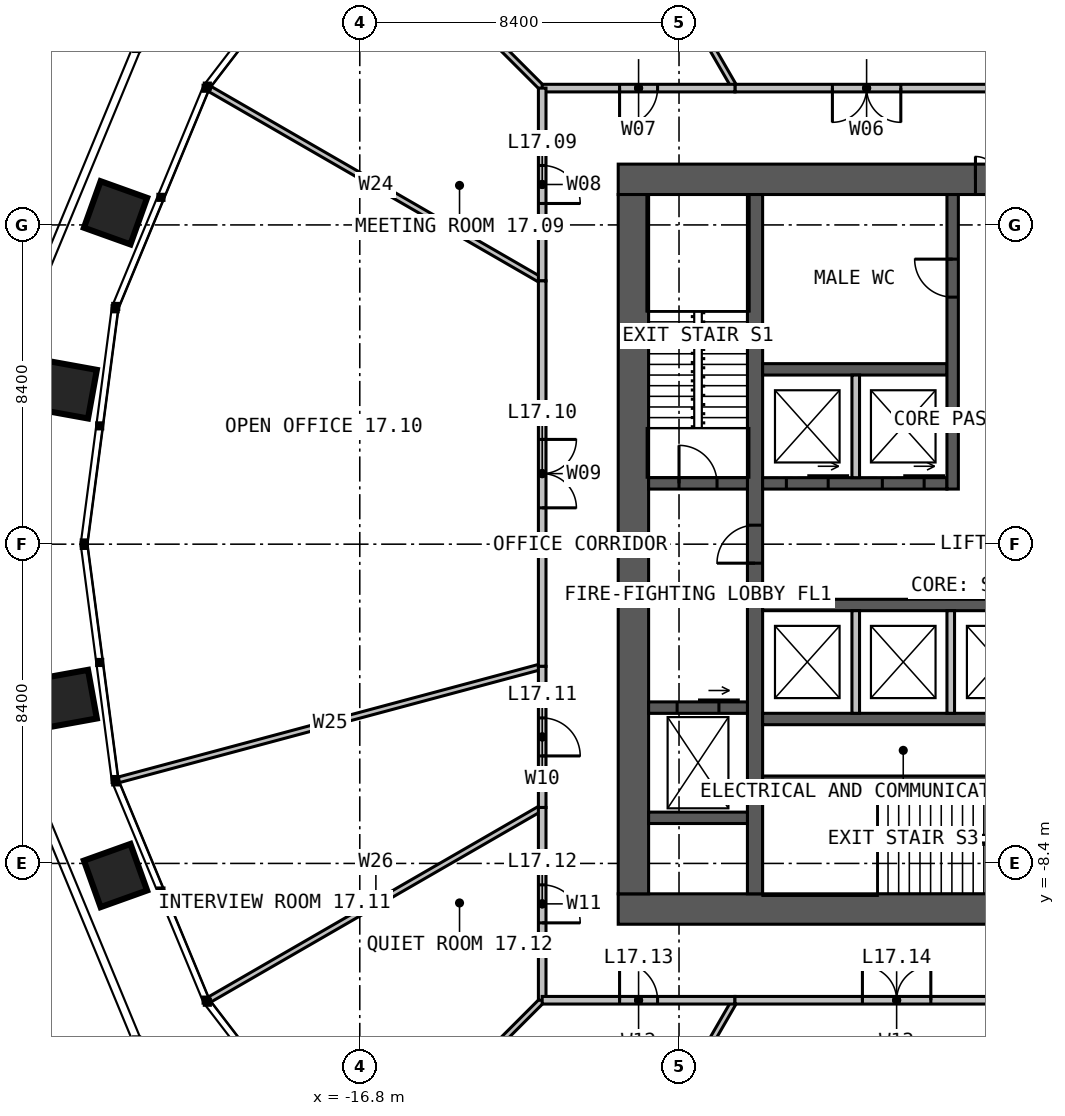
"""IFC4 building model, lengths in metres.
Left out: names, types, materials, properties, quantities, classifications, styles, units other than length and angle.
Written with IfcOpenShell. Run it as: python <this file> out.ifc"""

import sys

from ifc_helpers import new_model, si_unit, direction, frame, frame_2d, origin, place, context, subcontext, project, spatial, rectangle, extrude, element, fill, save


model = new_model("IFC4")
c1 = context("Model", 3, precision=1e-05, world=origin(), true_north=direction((0.0, 1.0)))
c2 = subcontext(c1, "Body", "Model", "MODEL_VIEW")
j1 = project(units=[si_unit("LENGTHUNIT", "METRE"), si_unit("PLANEANGLEUNIT", "RADIAN")], contexts=[c1])
p1 = place(None, origin())
s1 = spatial("IfcSite", under=j1, at=p1, CompositionType="ELEMENT")
p2 = place(p1, origin())
s2 = spatial("IfcBuilding", under=s1, at=p2, CompositionType="ELEMENT")
p3 = place(p2, frame((0.0, 0.0, 73.0)))
s3 = spatial("IfcBuildingStorey", under=s2, at=p3, CompositionType="ELEMENT", Elevation=73.0)
p4 = place(p3, frame((-10.0, 9.6, 0.0), z_axis=(0.0, 0.0, 1.0), x_axis=(1.0, 0.0, 0.0)))
e1 = element("IfcWall", 1, at=p4, inside=s3, PredefinedType="SOLIDWALL", context=c2, shape_type="SweptSolid", body=[
    extrude(rectangle(XDim=20.0, YDim=0.8, at=frame_2d((10.0, 0.0))), origin(), (0.0, 0.0, 1.0), 4.0),
])
p5 = place(p4, frame((9.4, 0.0, 0.0)))
e2 = element("IfcOpeningElement", 2, at=p5, cuts=e1, PredefinedType="OPENING", context=c2, shape_type="SweptSolid", body=[
    extrude(rectangle(XDim=1.2, YDim=2.2, at=frame_2d((0.6, 1.1))), frame((0.0, 0.41, 0.0), z_axis=(0.0, -1.0, 0.0), x_axis=(1.0, 0.0, 0.0)), (0.0, 0.0, 1.0), 0.82),
])
p6 = place(p3, frame((10.0, -9.6, 0.0), z_axis=(0.0, 0.0, 1.0), x_axis=(-1.0, 0.0, 0.0)))
e3 = element("IfcWall", 3, at=p6, inside=s3, PredefinedType="SOLIDWALL", context=c2, shape_type="SweptSolid", body=[
    extrude(rectangle(XDim=20.0, YDim=0.8, at=frame_2d((10.0, 0.0))), origin(), (0.0, 0.0, 1.0), 4.0),
])
p7 = place(p6, frame((6.875, 0.0, 0.0)))
e4 = element("IfcOpeningElement", 4, at=p7, cuts=e3, PredefinedType="OPENING", context=c2, shape_type="SweptSolid", body=[
    extrude(rectangle(XDim=1.2, YDim=2.2, at=frame_2d((0.6, 1.1))), frame((0.0, 0.41, 0.0), z_axis=(0.0, -1.0, 0.0), x_axis=(1.0, 0.0, 0.0)), (0.0, 0.0, 1.0), 0.82),
])
p8 = place(p3, frame((-9.6, 9.2, 0.0), z_axis=(0.0, 0.0, 1.0), x_axis=(0.0, -1.0, 0.0)))
e5 = element("IfcWall", 5, at=p8, inside=s3, PredefinedType="SOLIDWALL", context=c2, shape_type="SweptSolid", body=[
    extrude(rectangle(XDim=18.4, YDim=0.8, at=frame_2d((9.2, 0.0))), origin(), (0.0, 0.0, 1.0), 4.0),
])
p9 = place(p3, frame((-6.4, -9.2, 0.0), z_axis=(0.0, 0.0, 1.0), x_axis=(0.0, 1.0, 0.0)))
e6 = element("IfcWall", 6, at=p9, inside=s3, PredefinedType="SOLIDWALL", context=c2, shape_type="SweptSolid", body=[
    extrude(rectangle(XDim=18.4, YDim=0.4, at=frame_2d((9.2, 0.0))), origin(), (0.0, 0.0, 1.0), 4.0),
])
p10 = place(p9, frame((8.7, 0.0, 0.0)))
e7 = element("IfcOpeningElement", 7, at=p10, cuts=e6, PredefinedType="OPENING", context=c2, shape_type="SweptSolid", body=[
    extrude(rectangle(XDim=1.0, YDim=2.2, at=frame_2d((0.5, 1.1))), frame((0.0, 0.21, 0.0), z_axis=(0.0, -1.0, 0.0), x_axis=(1.0, 0.0, 0.0)), (0.0, 0.0, 1.0), 0.42),
])
p11 = place(p3, frame((-6.2, 1.6, 0.0), z_axis=(0.0, 0.0, 1.0), x_axis=(1.0, 0.0, 0.0)))
e8 = element("IfcWall", 8, at=p11, inside=s3, PredefinedType="SOLIDWALL", context=c2, shape_type="SweptSolid", body=[
    extrude(rectangle(XDim=4.85, YDim=0.3, at=frame_2d((2.425, 0.0))), origin(), (0.0, 0.0, 1.0), 4.0),
])
p12 = place(p11, frame((0.625, 0.0, 0.0)))
e9 = element("IfcOpeningElement", 9, at=p12, cuts=e8, PredefinedType="OPENING", context=c2, shape_type="SweptSolid", body=[
    extrude(rectangle(XDim=1.1, YDim=2.2, at=frame_2d((0.55, 1.1))), frame((0.0, 0.16, 0.0), z_axis=(0.0, -1.0, 0.0), x_axis=(1.0, 0.0, 0.0)), (0.0, 0.0, 1.0), 0.32),
])
p13 = place(p11, frame((3.15, 0.0, 0.0)))
e10 = element("IfcOpeningElement", 10, at=p13, cuts=e8, PredefinedType="OPENING", context=c2, shape_type="SweptSolid", body=[
    extrude(rectangle(XDim=1.1, YDim=2.2, at=frame_2d((0.55, 1.1))), frame((0.0, 0.16, 0.0), z_axis=(0.0, -1.0, 0.0), x_axis=(1.0, 0.0, 0.0)), (0.0, 0.0, 1.0), 0.32),
])
p14 = place(p3, frame((-6.2, 4.6, 0.0), z_axis=(0.0, 0.0, 1.0), x_axis=(1.0, 0.0, 0.0)))
e11 = element("IfcWall", 11, at=p14, inside=s3, PredefinedType="SOLIDWALL", context=c2, shape_type="SweptSolid", body=[
    extrude(rectangle(XDim=4.85, YDim=0.3, at=frame_2d((2.425, 0.0))), origin(), (0.0, 0.0, 1.0), 4.0),
])
p15 = place(p3, frame((-1.2, 1.45, 0.0), z_axis=(0.0, 0.0, 1.0), x_axis=(0.0, 1.0, 0.0)))
e12 = element("IfcWall", 12, at=p15, inside=s3, PredefinedType="SOLIDWALL", context=c2, shape_type="SweptSolid", body=[
    extrude(rectangle(XDim=7.75, YDim=0.3, at=frame_2d((3.875, 0.0))), origin(), (0.0, 0.0, 1.0), 4.0),
])
p16 = place(p15, frame((5.05, 0.0, 0.0)))
e13 = element("IfcOpeningElement", 13, at=p16, cuts=e12, PredefinedType="OPENING", context=c2, shape_type="SweptSolid", body=[
    extrude(rectangle(XDim=1.0, YDim=2.2, at=frame_2d((0.5, 1.1))), frame((0.0, 0.16, 0.0), z_axis=(0.0, -1.0, 0.0), x_axis=(1.0, 0.0, 0.0)), (0.0, 0.0, 1.0), 0.32),
])
for number, where, z_axis, x_axis in (
    (14, (-6.2, -1.6, 0.0), (0.0, 0.0, 1.0), (1.0, 0.0, 0.0)),
    (15, (-6.2, -4.6, 0.0), (0.0, 0.0, 1.0), (1.0, 0.0, 0.0)),
):
    element("IfcWall", number, at=place(p3, frame(where, z_axis=z_axis, x_axis=x_axis)), inside=s3, PredefinedType="SOLIDWALL", context=c2, shape_type="SweptSolid", body=[
        extrude(rectangle(XDim=7.4, YDim=0.3, at=frame_2d((3.7, 0.0))), origin(), (0.0, 0.0, 1.0), 4.0),
    ])
p17 = place(p3, frame((-6.2, -6.2, 0.0), z_axis=(0.0, 0.0, 1.0), x_axis=(1.0, 0.0, 0.0)))
e16 = element("IfcWall", 16, at=p17, inside=s3, PredefinedType="SOLIDWALL", context=c2, shape_type="SweptSolid", body=[
    extrude(rectangle(XDim=7.4, YDim=0.2, at=frame_2d((3.7, 0.0))), origin(), (0.0, 0.0, 1.0), 4.0),
])
p18 = place(p3, frame((-9.2, 1.6, 0.0), z_axis=(0.0, 0.0, 1.0), x_axis=(1.0, 0.0, 0.0)))
e17 = element("IfcWall", 17, at=p18, inside=s3, PredefinedType="SOLIDWALL", context=c2, shape_type="SweptSolid", body=[
    extrude(rectangle(XDim=2.6, YDim=0.3, at=frame_2d((1.3, 0.0))), origin(), (0.0, 0.0, 1.0), 4.0),
])
p19 = place(p18, frame((0.8, 0.0, 0.0)))
e18 = element("IfcOpeningElement", 18, at=p19, cuts=e17, PredefinedType="OPENING", context=c2, shape_type="SweptSolid", body=[
    extrude(rectangle(XDim=1.0, YDim=2.2, at=frame_2d((0.5, 1.1))), frame((0.0, 0.16, 0.0), z_axis=(0.0, -1.0, 0.0), x_axis=(1.0, 0.0, 0.0)), (0.0, 0.0, 1.0), 0.32),
])
p20 = place(p3, frame((-9.2, -4.3, 0.0), z_axis=(0.0, 0.0, 1.0), x_axis=(1.0, 0.0, 0.0)))
e19 = element("IfcWall", 19, at=p20, inside=s3, PredefinedType="SOLIDWALL", context=c2, shape_type="SweptSolid", body=[
    extrude(rectangle(XDim=2.6, YDim=0.3, at=frame_2d((1.3, 0.0))), origin(), (0.0, 0.0, 1.0), 4.0),
])
p21 = place(p20, frame((0.75, 0.0, 0.0)))
e20 = element("IfcOpeningElement", 20, at=p21, cuts=e19, PredefinedType="OPENING", context=c2, shape_type="SweptSolid", body=[
    extrude(rectangle(XDim=1.1, YDim=2.2, at=frame_2d((0.55, 1.1))), frame((0.0, 0.16, 0.0), z_axis=(0.0, -1.0, 0.0), x_axis=(1.0, 0.0, 0.0)), (0.0, 0.0, 1.0), 0.32),
])
p22 = place(p3, frame((-9.2, -7.2, 0.0), z_axis=(0.0, 0.0, 1.0), x_axis=(1.0, 0.0, 0.0)))
e21 = element("IfcWall", 21, at=p22, inside=s3, PredefinedType="SOLIDWALL", context=c2, shape_type="SweptSolid", body=[
    extrude(rectangle(XDim=2.6, YDim=0.3, at=frame_2d((1.3, 0.0))), origin(), (0.0, 0.0, 1.0), 4.0),
])
for number, where, z_axis, x_axis in (
    (22, (-3.75, 1.75, 0.0), (0.0, 0.0, 1.0), (0.0, 1.0, 0.0)),
    (23, (-3.75, -1.75, 0.0), (0.0, 0.0, 1.0), (0.0, -1.0, 0.0)),
    (24, (-1.25, -1.75, 0.0), (0.0, 0.0, 1.0), (0.0, -1.0, 0.0)),
):
    element("IfcWall", number, at=place(p3, frame(where, z_axis=z_axis, x_axis=x_axis)), inside=s3, PredefinedType="SOLIDWALL", context=c2, shape_type="SweptSolid", body=[
        extrude(rectangle(XDim=2.7, YDim=0.2, at=frame_2d((1.35, 0.0))), origin(), (0.0, 0.0, 1.0), 3.75),
    ])
p23 = place(p3, frame((-6.928, 12.0, 0.0), z_axis=(0.0, 0.0, 1.0), x_axis=(-0.500002673408, 0.866023860286, 0.0)))
e25 = element("IfcWall", 25, at=p23, inside=s3, PredefinedType="PARTITIONING", context=c2, shape_type="SweptSolid", body=[
    extrude(rectangle(XDim=10.106, YDim=0.15, at=frame_2d((5.053, 0.0))), origin(), (0.0, 0.0, 1.0), 2.79),
])
p24 = place(p3, frame((-12.0, 12.0, 0.0), z_axis=(0.0, 0.0, 1.0), x_axis=(-0.707106781187, 0.707106781187, 0.0)))
e26 = element("IfcWall", 26, at=p24, inside=s3, PredefinedType="PARTITIONING", context=c2, shape_type="SweptSolid", body=[
    extrude(rectangle(XDim=6.992, YDim=0.15, at=frame_2d((3.496, 0.0))), origin(), (0.0, 0.0, 1.0), 2.79),
])
p25 = place(p3, frame((-12.0, 6.928, 0.0), z_axis=(0.0, 0.0, 1.0), x_axis=(-0.866023860286, 0.500002673408, 0.0)))
e27 = element("IfcWall", 27, at=p25, inside=s3, PredefinedType="PARTITIONING", context=c2, shape_type="SweptSolid", body=[
    extrude(rectangle(XDim=10.106, YDim=0.15, at=frame_2d((5.053, 0.0))), origin(), (0.0, 0.0, 1.0), 2.79),
])
p26 = place(p3, frame((-12.0, -3.215, 0.0), z_axis=(0.0, 0.0, 1.0), x_axis=(-0.96592415734, -0.258825273624, 0.0)))
e28 = element("IfcWall", 28, at=p26, inside=s3, PredefinedType="PARTITIONING", context=c2, shape_type="SweptSolid", body=[
    extrude(rectangle(XDim=11.539, YDim=0.15, at=frame_2d((5.77, 0.0))), origin(), (0.0, 0.0, 1.0), 2.79),
])
p27 = place(p3, frame((-12.0, -6.928, 0.0), z_axis=(0.0, 0.0, 1.0), x_axis=(-0.866023860286, -0.500002673408, 0.0)))
e29 = element("IfcWall", 29, at=p27, inside=s3, PredefinedType="PARTITIONING", context=c2, shape_type="SweptSolid", body=[
    extrude(rectangle(XDim=10.106, YDim=0.15, at=frame_2d((5.053, 0.0))), origin(), (0.0, 0.0, 1.0), 2.79),
])
p28 = place(p3, frame((-12.0, -12.0, 0.0), z_axis=(0.0, 0.0, 1.0), x_axis=(-0.707106781187, -0.707106781187, 0.0)))
e30 = element("IfcWall", 30, at=p28, inside=s3, PredefinedType="PARTITIONING", context=c2, shape_type="SweptSolid", body=[
    extrude(rectangle(XDim=6.992, YDim=0.15, at=frame_2d((3.496, 0.0))), origin(), (0.0, 0.0, 1.0), 2.79),
])
p29 = place(p3, frame((-6.928, -12.0, 0.0), z_axis=(0.0, 0.0, 1.0), x_axis=(-0.500002673408, -0.866023860286, 0.0)))
e31 = element("IfcWall", 31, at=p29, inside=s3, PredefinedType="PARTITIONING", context=c2, shape_type="SweptSolid", body=[
    extrude(rectangle(XDim=10.106, YDim=0.15, at=frame_2d((5.053, 0.0))), origin(), (0.0, 0.0, 1.0), 2.79),
])
p30 = place(p3, frame((0.0, 12.0, 0.0), z_axis=(0.0, 0.0, 1.0), x_axis=(-1.0, 0.0, 0.0)))
e32 = element("IfcWall", 32, at=p30, inside=s3, PredefinedType="PARTITIONING", context=c2, shape_type="SweptSolid", body=[
    extrude(rectangle(XDim=6.928, YDim=0.2, at=frame_2d((3.464, 0.0))), origin(), (0.0, 0.0, 1.0), 3.8),
])
p31 = place(p30, frame((2.564, 0.0, 0.0)))
e33 = element("IfcOpeningElement", 33, at=p31, cuts=e32, PredefinedType="OPENING", context=c2, shape_type="SweptSolid", body=[
    extrude(rectangle(XDim=1.8, YDim=2.2, at=frame_2d((0.9, 1.1))), frame((0.0, 0.11, 0.0), z_axis=(0.0, -1.0, 0.0), x_axis=(1.0, 0.0, 0.0)), (0.0, 0.0, 1.0), 0.22),
])
p32 = place(p3, frame((-6.928, 12.0, 0.0), z_axis=(0.0, 0.0, 1.0), x_axis=(-1.0, 0.0, 0.0)))
e34 = element("IfcWall", 34, at=p32, inside=s3, PredefinedType="PARTITIONING", context=c2, shape_type="SweptSolid", body=[
    extrude(rectangle(XDim=5.072, YDim=0.2, at=frame_2d((2.536, 0.0))), origin(), (0.0, 0.0, 1.0), 3.8),
])
p33 = place(p32, frame((2.036, 0.0, 0.0)))
e35 = element("IfcOpeningElement", 35, at=p33, cuts=e34, PredefinedType="OPENING", context=c2, shape_type="SweptSolid", body=[
    extrude(rectangle(XDim=1.0, YDim=2.2, at=frame_2d((0.5, 1.1))), frame((0.0, 0.11, 0.0), z_axis=(0.0, -1.0, 0.0), x_axis=(1.0, 0.0, 0.0)), (0.0, 0.0, 1.0), 0.22),
])
p34 = place(p3, frame((-12.0, 12.0, 0.0), z_axis=(0.0, 0.0, 1.0), x_axis=(0.0, -1.0, 0.0)))
e36 = element("IfcWall", 36, at=p34, inside=s3, PredefinedType="PARTITIONING", context=c2, shape_type="SweptSolid", body=[
    extrude(rectangle(XDim=5.072, YDim=0.2, at=frame_2d((2.536, 0.0))), origin(), (0.0, 0.0, 1.0), 3.8),
])
p35 = place(p34, frame((2.036, 0.0, 0.0)))
e37 = element("IfcOpeningElement", 37, at=p35, cuts=e36, PredefinedType="OPENING", context=c2, shape_type="SweptSolid", body=[
    extrude(rectangle(XDim=1.0, YDim=2.2, at=frame_2d((0.5, 1.1))), frame((0.0, 0.11, 0.0), z_axis=(0.0, -1.0, 0.0), x_axis=(1.0, 0.0, 0.0)), (0.0, 0.0, 1.0), 0.22),
])
p36 = place(p3, frame((-12.0, 6.928, 0.0), z_axis=(0.0, 0.0, 1.0), x_axis=(0.0, -1.0, 0.0)))
e38 = element("IfcWall", 38, at=p36, inside=s3, PredefinedType="PARTITIONING", context=c2, shape_type="SweptSolid", body=[
    extrude(rectangle(XDim=10.144, YDim=0.2, at=frame_2d((5.072, 0.0))), origin(), (0.0, 0.0, 1.0), 3.8),
])
p37 = place(p36, frame((4.172, 0.0, 0.0)))
e39 = element("IfcOpeningElement", 39, at=p37, cuts=e38, PredefinedType="OPENING", context=c2, shape_type="SweptSolid", body=[
    extrude(rectangle(XDim=1.8, YDim=2.2, at=frame_2d((0.9, 1.1))), frame((0.0, 0.11, 0.0), z_axis=(0.0, -1.0, 0.0), x_axis=(1.0, 0.0, 0.0)), (0.0, 0.0, 1.0), 0.22),
])
p38 = place(p3, frame((-12.0, -3.215, 0.0), z_axis=(0.0, 0.0, 1.0), x_axis=(0.0, -1.0, 0.0)))
e40 = element("IfcWall", 40, at=p38, inside=s3, PredefinedType="PARTITIONING", context=c2, shape_type="SweptSolid", body=[
    extrude(rectangle(XDim=3.713, YDim=0.2, at=frame_2d((1.856, 0.0))), origin(), (0.0, 0.0, 1.0), 3.8),
])
p39 = place(p38, frame((1.356, 0.0, 0.0)))
e41 = element("IfcOpeningElement", 41, at=p39, cuts=e40, PredefinedType="OPENING", context=c2, shape_type="SweptSolid", body=[
    extrude(rectangle(XDim=1.0, YDim=2.2, at=frame_2d((0.5, 1.1))), frame((0.0, 0.11, 0.0), z_axis=(0.0, -1.0, 0.0), x_axis=(1.0, 0.0, 0.0)), (0.0, 0.0, 1.0), 0.22),
])
p40 = place(p3, frame((-12.0, -6.928, 0.0), z_axis=(0.0, 0.0, 1.0), x_axis=(0.0, -1.0, 0.0)))
e42 = element("IfcWall", 42, at=p40, inside=s3, PredefinedType="PARTITIONING", context=c2, shape_type="SweptSolid", body=[
    extrude(rectangle(XDim=5.072, YDim=0.2, at=frame_2d((2.536, 0.0))), origin(), (0.0, 0.0, 1.0), 3.8),
])
p41 = place(p40, frame((2.036, 0.0, 0.0)))
e43 = element("IfcOpeningElement", 43, at=p41, cuts=e42, PredefinedType="OPENING", context=c2, shape_type="SweptSolid", body=[
    extrude(rectangle(XDim=1.0, YDim=2.2, at=frame_2d((0.5, 1.1))), frame((0.0, 0.11, 0.0), z_axis=(0.0, -1.0, 0.0), x_axis=(1.0, 0.0, 0.0)), (0.0, 0.0, 1.0), 0.22),
])
p42 = place(p3, frame((-12.0, -12.0, 0.0), z_axis=(0.0, 0.0, 1.0), x_axis=(1.0, 0.0, 0.0)))
e44 = element("IfcWall", 44, at=p42, inside=s3, PredefinedType="PARTITIONING", context=c2, shape_type="SweptSolid", body=[
    extrude(rectangle(XDim=5.072, YDim=0.2, at=frame_2d((2.536, 0.0))), origin(), (0.0, 0.0, 1.0), 3.8),
])
p43 = place(p42, frame((2.036, 0.0, 0.0)))
e45 = element("IfcOpeningElement", 45, at=p43, cuts=e44, PredefinedType="OPENING", context=c2, shape_type="SweptSolid", body=[
    extrude(rectangle(XDim=1.0, YDim=2.2, at=frame_2d((0.5, 1.1))), frame((0.0, 0.11, 0.0), z_axis=(0.0, -1.0, 0.0), x_axis=(1.0, 0.0, 0.0)), (0.0, 0.0, 1.0), 0.22),
])
p44 = place(p3, frame((-6.928, -12.0, 0.0), z_axis=(0.0, 0.0, 1.0), x_axis=(1.0, 0.0, 0.0)))
e46 = element("IfcWall", 46, at=p44, inside=s3, PredefinedType="PARTITIONING", context=c2, shape_type="SweptSolid", body=[
    extrude(rectangle(XDim=8.508, YDim=0.2, at=frame_2d((4.254, 0.0))), origin(), (0.0, 0.0, 1.0), 3.8),
])
p45 = place(p44, frame((3.354, 0.0, 0.0)))
e47 = element("IfcOpeningElement", 47, at=p45, cuts=e46, PredefinedType="OPENING", context=c2, shape_type="SweptSolid", body=[
    extrude(rectangle(XDim=1.8, YDim=2.2, at=frame_2d((0.9, 1.1))), frame((0.0, 0.11, 0.0), z_axis=(0.0, -1.0, 0.0), x_axis=(1.0, 0.0, 0.0)), (0.0, 0.0, 1.0), 0.22),
])
p46 = place(p5, origin())
e48 = element("IfcDoor", 48, at=p46, inside=s3, OperationType="DOUBLE_DOOR_SINGLE_SWING", PredefinedType="DOOR", context=c2, shape_type="SweptSolid", body=[
    extrude(rectangle(XDim=1.2, YDim=2.2, at=frame_2d((0.6, 1.1))), frame((0.0, 0.025, 0.0), z_axis=(0.0, -1.0, 0.0), x_axis=(1.0, 0.0, 0.0)), (0.0, 0.0, 1.0), 0.05),
])
fill(e2, e48)
p47 = place(p10, origin())
e49 = element("IfcDoor", 49, at=p47, inside=s3, OperationType="SINGLE_SWING_LEFT", PredefinedType="DOOR", context=c2, shape_type="SweptSolid", body=[
    extrude(rectangle(XDim=1.0, YDim=2.2, at=frame_2d((0.5, 1.1))), frame((0.0, 0.025, 0.0), z_axis=(0.0, -1.0, 0.0), x_axis=(1.0, 0.0, 0.0)), (0.0, 0.0, 1.0), 0.05),
])
fill(e7, e49)
p48 = place(p19, origin())
e50 = element("IfcDoor", 50, at=p48, inside=s3, OperationType="SINGLE_SWING_LEFT", PredefinedType="DOOR", context=c2, shape_type="SweptSolid", body=[
    extrude(rectangle(XDim=1.0, YDim=2.2, at=frame_2d((0.5, 1.1))), frame((0.0, 0.025, 0.0), z_axis=(0.0, -1.0, 0.0), x_axis=(1.0, 0.0, 0.0)), (0.0, 0.0, 1.0), 0.05),
])
fill(e18, e50)
p49 = place(p16, origin())
e51 = element("IfcDoor", 51, at=p49, inside=s3, OperationType="SINGLE_SWING_RIGHT", PredefinedType="DOOR", context=c2, shape_type="SweptSolid", body=[
    extrude(rectangle(XDim=1.0, YDim=2.2, at=frame_2d((0.5, 1.1))), frame((0.0, 0.025, 0.0), z_axis=(0.0, -1.0, 0.0), x_axis=(1.0, 0.0, 0.0)), (0.0, 0.0, 1.0), 0.05),
])
fill(e13, e51)
p50 = place(p12, origin())
e52 = element("IfcDoor", 52, at=p50, inside=s3, OperationType="SLIDING_TO_LEFT", PredefinedType="DOOR", context=c2, shape_type="SweptSolid", body=[
    extrude(rectangle(XDim=1.1, YDim=2.2, at=frame_2d((0.55, 1.1))), frame((0.0, 0.025, 0.0), z_axis=(0.0, -1.0, 0.0), x_axis=(1.0, 0.0, 0.0)), (0.0, 0.0, 1.0), 0.05),
])
fill(e9, e52)
p51 = place(p13, origin())
e53 = element("IfcDoor", 53, at=p51, inside=s3, OperationType="SLIDING_TO_LEFT", PredefinedType="DOOR", context=c2, shape_type="SweptSolid", body=[
    extrude(rectangle(XDim=1.1, YDim=2.2, at=frame_2d((0.55, 1.1))), frame((0.0, 0.025, 0.0), z_axis=(0.0, -1.0, 0.0), x_axis=(1.0, 0.0, 0.0)), (0.0, 0.0, 1.0), 0.05),
])
fill(e10, e53)
p52 = place(p21, origin())
e54 = element("IfcDoor", 54, at=p52, inside=s3, OperationType="SLIDING_TO_LEFT", PredefinedType="DOOR", context=c2, shape_type="SweptSolid", body=[
    extrude(rectangle(XDim=1.1, YDim=2.2, at=frame_2d((0.55, 1.1))), frame((0.0, 0.025, 0.0), z_axis=(0.0, -1.0, 0.0), x_axis=(1.0, 0.0, 0.0)), (0.0, 0.0, 1.0), 0.05),
])
fill(e20, e54)
p53 = place(p31, origin())
e55 = element("IfcDoor", 55, at=p53, inside=s3, OperationType="DOUBLE_DOOR_SINGLE_SWING", PredefinedType="DOOR", context=c2, shape_type="SweptSolid", body=[
    extrude(rectangle(XDim=1.8, YDim=2.2, at=frame_2d((0.9, 1.1))), frame((0.0, 0.025, 0.0), z_axis=(0.0, -1.0, 0.0), x_axis=(1.0, 0.0, 0.0)), (0.0, 0.0, 1.0), 0.05),
])
fill(e33, e55)
p54 = place(p33, origin())
e56 = element("IfcDoor", 56, at=p54, inside=s3, OperationType="SINGLE_SWING_RIGHT", PredefinedType="DOOR", context=c2, shape_type="SweptSolid", body=[
    extrude(rectangle(XDim=1.0, YDim=2.2, at=frame_2d((0.5, 1.1))), frame((0.0, 0.025, 0.0), z_axis=(0.0, -1.0, 0.0), x_axis=(1.0, 0.0, 0.0)), (0.0, 0.0, 1.0), 0.05),
])
fill(e35, e56)
p55 = place(p35, origin())
e57 = element("IfcDoor", 57, at=p55, inside=s3, OperationType="SINGLE_SWING_RIGHT", PredefinedType="DOOR", context=c2, shape_type="SweptSolid", body=[
    extrude(rectangle(XDim=1.0, YDim=2.2, at=frame_2d((0.5, 1.1))), frame((0.0, 0.025, 0.0), z_axis=(0.0, -1.0, 0.0), x_axis=(1.0, 0.0, 0.0)), (0.0, 0.0, 1.0), 0.05),
])
fill(e37, e57)
p56 = place(p37, origin())
e58 = element("IfcDoor", 58, at=p56, inside=s3, OperationType="DOUBLE_DOOR_SINGLE_SWING", PredefinedType="DOOR", context=c2, shape_type="SweptSolid", body=[
    extrude(rectangle(XDim=1.8, YDim=2.2, at=frame_2d((0.9, 1.1))), frame((0.0, 0.025, 0.0), z_axis=(0.0, -1.0, 0.0), x_axis=(1.0, 0.0, 0.0)), (0.0, 0.0, 1.0), 0.05),
])
fill(e39, e58)
p57 = place(p39, origin())
e59 = element("IfcDoor", 59, at=p57, inside=s3, OperationType="SINGLE_SWING_RIGHT", PredefinedType="DOOR", context=c2, shape_type="SweptSolid", body=[
    extrude(rectangle(XDim=1.0, YDim=2.2, at=frame_2d((0.5, 1.1))), frame((0.0, 0.025, 0.0), z_axis=(0.0, -1.0, 0.0), x_axis=(1.0, 0.0, 0.0)), (0.0, 0.0, 1.0), 0.05),
])
fill(e41, e59)
p58 = place(p41, origin())
e60 = element("IfcDoor", 60, at=p58, inside=s3, OperationType="SINGLE_SWING_RIGHT", PredefinedType="DOOR", context=c2, shape_type="SweptSolid", body=[
    extrude(rectangle(XDim=1.0, YDim=2.2, at=frame_2d((0.5, 1.1))), frame((0.0, 0.025, 0.0), z_axis=(0.0, -1.0, 0.0), x_axis=(1.0, 0.0, 0.0)), (0.0, 0.0, 1.0), 0.05),
])
fill(e43, e60)
p59 = place(p43, origin())
e61 = element("IfcDoor", 61, at=p59, inside=s3, OperationType="SINGLE_SWING_LEFT", PredefinedType="DOOR", context=c2, shape_type="SweptSolid", body=[
    extrude(rectangle(XDim=1.0, YDim=2.2, at=frame_2d((0.5, 1.1))), frame((0.0, 0.025, 0.0), z_axis=(0.0, -1.0, 0.0), x_axis=(1.0, 0.0, 0.0)), (0.0, 0.0, 1.0), 0.05),
])
fill(e45, e61)
p60 = place(p45, origin())
e62 = element("IfcDoor", 62, at=p60, inside=s3, OperationType="DOUBLE_DOOR_SINGLE_SWING", PredefinedType="DOOR", context=c2, shape_type="SweptSolid", body=[
    extrude(rectangle(XDim=1.8, YDim=2.2, at=frame_2d((0.9, 1.1))), frame((0.0, 0.025, 0.0), z_axis=(0.0, -1.0, 0.0), x_axis=(1.0, 0.0, 0.0)), (0.0, 0.0, 1.0), 0.05),
])
fill(e47, e62)
save(model, sys.argv[1])
